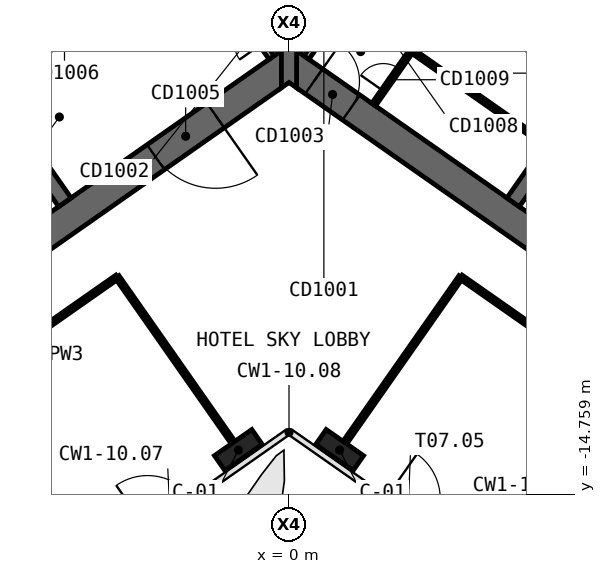
"""IFC4 building model, lengths in metres.
Left out: names, types, materials, properties, quantities, classifications, styles, units other than length and angle.
Written with IfcOpenShell. Run it as: python <this file> out.ifc"""

import sys

from ifc_helpers import new_model, si_unit, direction, frame, frame_2d, origin, origin_2d, place, context, subcontext, project, spatial, polyline, rectangle, outline, extrude, element, fill, save


model = new_model("IFC4")
c1 = context("Model", 3, precision=1e-05, world=origin(), true_north=direction((0.0, 1.0)))
c2 = subcontext(c1, "Body", "Model", "MODEL_VIEW")
j1 = project(units=[si_unit("LENGTHUNIT", "METRE"), si_unit("PLANEANGLEUNIT", "RADIAN")], contexts=[c1])
p1 = place(None, origin())
s1 = spatial("IfcSite", under=j1, at=p1, CompositionType="ELEMENT")
p2 = place(p1, origin())
s2 = spatial("IfcBuilding", under=s1, at=p2, CompositionType="ELEMENT")
p3 = place(p2, frame((0.0, 0.0, 48.5)))
s3 = spatial("IfcBuildingStorey", under=s2, at=p3, CompositionType="ELEMENT", Elevation=48.5)
p4 = place(p3, frame((0.037, 11.867, 0.0), z_axis=(0.0, 0.0, 1.0), x_axis=(-0.819155306259, -0.573571777746, 0.0)))
e1 = element("IfcWall", 1, at=p4, inside=s3, PredefinedType="SHEAR", context=c2, shape_type="SweptSolid", body=[
    extrude(outline(polyline([(33.837, 0.5), (0.7, 0.5), (0.0, -0.5), (33.837, -0.5), (33.837, 0.5)])), origin(), (0.0, 0.0, 1.0), 6.0),
])
p5 = place(p3, frame((0.037, -0.585, 0.0), z_axis=(0.0, 0.0, 1.0), x_axis=(-0.819157152511, -0.573569140985, 0.0)))
e2 = element("IfcWall", 2, at=p5, inside=s3, PredefinedType="SHEAR", context=c2, shape_type="SweptSolid", body=[
    extrude(outline(polyline([(26.695, 0.5), (0.7, 0.5), (0.0, -0.5), (26.695, -0.5), (26.695, 0.5)])), origin(), (0.0, 0.0, 1.0), 6.0),
])
p6 = place(p5, frame((2.995, 0.0, 0.0)))
e3 = element("IfcOpeningElement", 3, at=p6, cuts=e2, PredefinedType="OPENING", context=c2, shape_type="SweptSolid", body=[
    extrude(rectangle(XDim=2.4, YDim=2.1, at=frame_2d((1.2, 1.05))), frame((0.0, 0.51, 0.0), z_axis=(0.0, -1.0, 0.0), x_axis=(1.0, 0.0, 0.0)), (0.0, 0.0, 1.0), 1.02),
])
p7 = place(p5, frame((11.995, 0.0, 0.0)))
e4 = element("IfcOpeningElement", 4, at=p7, cuts=e2, PredefinedType="OPENING", context=c2, shape_type="SweptSolid", body=[
    extrude(rectangle(XDim=2.4, YDim=2.1, at=frame_2d((1.2, 1.05))), frame((0.0, 0.51, 0.0), z_axis=(0.0, -1.0, 0.0), x_axis=(1.0, 0.0, 0.0)), (0.0, 0.0, 1.0), 1.02),
])
p8 = place(p3, frame((-7.372, -5.162, 0.0), z_axis=(0.0, 0.0, 1.0), x_axis=(-0.573594173421, 0.819139624372, 0.0)))
e5 = element("IfcWall", 5, at=p8, inside=s3, PredefinedType="SHEAR", context=c2, shape_type="SweptSolid", body=[
    extrude(outline(polyline([(4.35, 0.25), (0.0, 0.25), (0.0, -0.25), (4.35, -0.25), (4.35, 0.25)])), origin(), (0.0, 0.0, 1.0), 6.0),
])
p9 = place(p3, frame((-2.638, 3.768, 0.0), z_axis=(0.0, 0.0, 1.0), x_axis=(-0.819148977158, -0.573580816643, 0.0)))
e6 = element("IfcWall", 6, at=p9, inside=s3, PredefinedType="SHEAR", context=c2, shape_type="SweptSolid", body=[
    extrude(outline(polyline([(26.0, 0.25), (0.0, 0.25), (0.0, -0.25), (26.0, -0.25), (26.0, 0.25)])), origin(), (0.0, 0.0, 1.0), 6.0),
])
p10 = place(p9, frame((1.169, 0.0, 0.0)))
e7 = element("IfcOpeningElement", 7, at=p10, cuts=e6, PredefinedType="OPENING", context=c2, shape_type="SweptSolid", body=[
    extrude(rectangle(XDim=1.1, YDim=2.1, at=frame_2d((0.55, 1.05))), frame((0.0, 0.26, 0.0), z_axis=(0.0, -1.0, 0.0), x_axis=(1.0, 0.0, 0.0)), (0.0, 0.0, 1.0), 0.52),
])
p11 = place(p9, frame((3.206, 0.0, 0.0)))
e8 = element("IfcOpeningElement", 8, at=p11, cuts=e6, PredefinedType="OPENING", context=c2, shape_type="SweptSolid", body=[
    extrude(rectangle(XDim=1.1, YDim=2.1, at=frame_2d((0.55, 1.05))), frame((0.0, 0.26, 0.0), z_axis=(0.0, -1.0, 0.0), x_axis=(1.0, 0.0, 0.0)), (0.0, 0.0, 1.0), 0.52),
])
p12 = place(p9, frame((5.244, 0.0, 0.0)))
e9 = element("IfcOpeningElement", 9, at=p12, cuts=e6, PredefinedType="OPENING", context=c2, shape_type="SweptSolid", body=[
    extrude(rectangle(XDim=1.1, YDim=2.1, at=frame_2d((0.55, 1.05))), frame((0.0, 0.26, 0.0), z_axis=(0.0, -1.0, 0.0), x_axis=(1.0, 0.0, 0.0)), (0.0, 0.0, 1.0), 0.52),
])
p13 = place(p9, frame((7.281, 0.0, 0.0)))
e10 = element("IfcOpeningElement", 10, at=p13, cuts=e6, PredefinedType="OPENING", context=c2, shape_type="SweptSolid", body=[
    extrude(rectangle(XDim=1.1, YDim=2.1, at=frame_2d((0.55, 1.05))), frame((0.0, 0.26, 0.0), z_axis=(0.0, -1.0, 0.0), x_axis=(1.0, 0.0, 0.0)), (0.0, 0.0, 1.0), 0.52),
])
p14 = place(p9, frame((9.688, 0.0, 0.0)))
e11 = element("IfcOpeningElement", 11, at=p14, cuts=e6, PredefinedType="OPENING", context=c2, shape_type="SweptSolid", body=[
    extrude(rectangle(XDim=1.1, YDim=2.1, at=frame_2d((0.55, 1.05))), frame((0.0, 0.26, 0.0), z_axis=(0.0, -1.0, 0.0), x_axis=(1.0, 0.0, 0.0)), (0.0, 0.0, 1.0), 0.52),
])
p15 = place(p9, frame((11.863, 0.0, 0.0)))
e12 = element("IfcOpeningElement", 12, at=p15, cuts=e6, PredefinedType="OPENING", context=c2, shape_type="SweptSolid", body=[
    extrude(rectangle(XDim=1.1, YDim=2.1, at=frame_2d((0.55, 1.05))), frame((0.0, 0.26, 0.0), z_axis=(0.0, -1.0, 0.0), x_axis=(1.0, 0.0, 0.0)), (0.0, 0.0, 1.0), 0.52),
])
p16 = place(p9, frame((14.038, 0.0, 0.0)))
e13 = element("IfcOpeningElement", 13, at=p16, cuts=e6, PredefinedType="OPENING", context=c2, shape_type="SweptSolid", body=[
    extrude(rectangle(XDim=1.1, YDim=2.1, at=frame_2d((0.55, 1.05))), frame((0.0, 0.26, 0.0), z_axis=(0.0, -1.0, 0.0), x_axis=(1.0, 0.0, 0.0)), (0.0, 0.0, 1.0), 0.52),
])
p17 = place(p9, frame((16.212, 0.0, 0.0)))
e14 = element("IfcOpeningElement", 14, at=p17, cuts=e6, PredefinedType="OPENING", context=c2, shape_type="SweptSolid", body=[
    extrude(rectangle(XDim=1.1, YDim=2.1, at=frame_2d((0.55, 1.05))), frame((0.0, 0.26, 0.0), z_axis=(0.0, -1.0, 0.0), x_axis=(1.0, 0.0, 0.0)), (0.0, 0.0, 1.0), 0.52),
])
p18 = place(p3, frame((-0.037, 11.867, 0.0), z_axis=(0.0, 0.0, 1.0), x_axis=(0.819155306259, -0.573571777746, 0.0)))
e15 = element("IfcWall", 15, at=p18, inside=s3, PredefinedType="SHEAR", context=c2, shape_type="SweptSolid", body=[
    extrude(outline(polyline([(33.837, 0.5), (0.0, 0.5), (0.7, -0.5), (33.837, -0.5), (33.837, 0.5)])), origin(), (0.0, 0.0, 1.0), 6.0),
])
p19 = place(p3, frame((-0.037, -0.585, 0.0), z_axis=(0.0, 0.0, 1.0), x_axis=(0.819157152511, -0.573569140985, 0.0)))
e16 = element("IfcWall", 16, at=p19, inside=s3, PredefinedType="SHEAR", context=c2, shape_type="SweptSolid", body=[
    extrude(outline(polyline([(26.695, 0.5), (0.0, 0.5), (0.7, -0.5), (26.695, -0.5), (26.695, 0.5)])), origin(), (0.0, 0.0, 1.0), 6.0),
])
p20 = place(p19, frame((1.045, 0.0, 0.0)))
e17 = element("IfcOpeningElement", 17, at=p20, cuts=e16, PredefinedType="OPENING", context=c2, shape_type="SweptSolid", body=[
    extrude(rectangle(XDim=1.5, YDim=2.1, at=frame_2d((0.75, 1.05))), frame((0.0, 0.51, 0.0), z_axis=(0.0, -1.0, 0.0), x_axis=(1.0, 0.0, 0.0)), (0.0, 0.0, 1.0), 1.02),
])
p21 = place(p19, frame((12.445, 0.0, 0.0)))
e18 = element("IfcOpeningElement", 18, at=p21, cuts=e16, PredefinedType="OPENING", context=c2, shape_type="SweptSolid", body=[
    extrude(rectangle(XDim=1.5, YDim=2.1, at=frame_2d((0.75, 1.05))), frame((0.0, 0.51, 0.0), z_axis=(0.0, -1.0, 0.0), x_axis=(1.0, 0.0, 0.0)), (0.0, 0.0, 1.0), 1.02),
])
p22 = place(p3, frame((7.372, -5.162, 0.0), z_axis=(0.0, 0.0, 1.0), x_axis=(0.573594173421, 0.819139624372, 0.0)))
e19 = element("IfcWall", 19, at=p22, inside=s3, PredefinedType="SHEAR", context=c2, shape_type="SweptSolid", body=[
    extrude(outline(polyline([(0.0, 0.25), (0.0, -0.25), (4.35, -0.25), (4.35, 0.25), (0.0, 0.25)])), origin(), (0.0, 0.0, 1.0), 6.0),
])
p23 = place(p3, frame((2.638, 3.768, 0.0), z_axis=(0.0, 0.0, 1.0), x_axis=(0.819148977158, -0.573580816643, 0.0)))
e20 = element("IfcWall", 20, at=p23, inside=s3, PredefinedType="SHEAR", context=c2, shape_type="SweptSolid", body=[
    extrude(outline(polyline([(0.0, 0.25), (0.0, -0.25), (26.0, -0.25), (26.0, 0.25), (0.0, 0.25)])), origin(), (0.0, 0.0, 1.0), 6.0),
])
p24 = place(p23, frame((9.637, 0.0, 0.0)))
e21 = element("IfcOpeningElement", 21, at=p24, cuts=e20, PredefinedType="OPENING", context=c2, shape_type="SweptSolid", body=[
    extrude(rectangle(XDim=1.2, YDim=2.1, at=frame_2d((0.6, 1.05))), frame((0.0, 0.26, 0.0), z_axis=(0.0, -1.0, 0.0), x_axis=(1.0, 0.0, 0.0)), (0.0, 0.0, 1.0), 0.52),
])
p25 = place(p23, frame((11.812, 0.0, 0.0)))
e22 = element("IfcOpeningElement", 22, at=p25, cuts=e20, PredefinedType="OPENING", context=c2, shape_type="SweptSolid", body=[
    extrude(rectangle(XDim=1.2, YDim=2.1, at=frame_2d((0.6, 1.05))), frame((0.0, 0.26, 0.0), z_axis=(0.0, -1.0, 0.0), x_axis=(1.0, 0.0, 0.0)), (0.0, 0.0, 1.0), 0.52),
])
p26 = place(p23, frame((13.988, 0.0, 0.0)))
e23 = element("IfcOpeningElement", 23, at=p26, cuts=e20, PredefinedType="OPENING", context=c2, shape_type="SweptSolid", body=[
    extrude(rectangle(XDim=1.2, YDim=2.1, at=frame_2d((0.6, 1.05))), frame((0.0, 0.26, 0.0), z_axis=(0.0, -1.0, 0.0), x_axis=(1.0, 0.0, 0.0)), (0.0, 0.0, 1.0), 0.52),
])
p27 = place(p23, frame((16.262, 0.0, 0.0)))
e24 = element("IfcOpeningElement", 24, at=p27, cuts=e20, PredefinedType="OPENING", context=c2, shape_type="SweptSolid", body=[
    extrude(rectangle(XDim=1.0, YDim=2.1, at=frame_2d((0.5, 1.05))), frame((0.0, 0.26, 0.0), z_axis=(0.0, -1.0, 0.0), x_axis=(1.0, 0.0, 0.0)), (0.0, 0.0, 1.0), 0.52),
])
p28 = place(p3, frame((0.0, -1.396, 0.0), z_axis=(0.0, 0.0, 1.0), x_axis=(0.0, 1.0, 0.0)))
e25 = element("IfcWall", 25, at=p28, inside=s3, PredefinedType="SHEAR", context=c2, shape_type="SweptSolid", body=[
    extrude(outline(polyline([(0.0, -0.25), (0.175, -0.25), (1.221, -0.25), (12.452, -0.25), (13.848, -0.25), (13.857, -0.25), (13.968, -0.172), (13.848, 0.0), (13.968, 0.172), (13.857, 0.25), (13.848, 0.25), (12.452, 0.25), (1.221, 0.25), (0.175, 0.25), (0.0, 0.25), (0.175, 0.0), (0.0, -0.25)])), origin(), (0.0, 0.0, 1.0), 6.0),
])
for number, where, z_axis, x_axis in (
    (26, (-1.665, -13.313, 0.0), (0.0, 0.0, 1.0), (-0.819, -0.574, 0.0)),
    (27, (1.665, -13.313, 0.0), (0.0, 0.0, 1.0), (0.819, -0.574, 0.0)),
):
    element("IfcColumn", number, at=place(p3, frame(where, z_axis=z_axis, x_axis=x_axis)), inside=s3, PredefinedType="COLUMN", context=c2, shape_type="SweptSolid", body=[
        extrude(rectangle(XDim=1.5, YDim=0.6, at=origin_2d()), origin(), (0.0, 0.0, 1.0), 6.0),
    ])
p29 = place(p3, frame((2.785, -1.95, 0.0), z_axis=(0.0, 0.0, 1.0), x_axis=(0.57356780395, 0.819158088694, 0.0)))
e28 = element("IfcWall", 28, at=p29, inside=s3, PredefinedType="PARTITIONING", context=c2, shape_type="SweptSolid", body=[
    extrude(rectangle(XDim=4.35, YDim=0.15, at=frame_2d((2.175, 0.0))), origin(), (0.0, 0.0, 1.0), 5.72),
])
p30 = place(p29, frame((0.55, 0.0, 0.0)))
e29 = element("IfcOpeningElement", 29, at=p30, cuts=e28, PredefinedType="OPENING", context=c2, shape_type="SweptSolid", body=[
    extrude(rectangle(XDim=0.9, YDim=2.1, at=frame_2d((0.45, 1.05))), frame((0.0, 0.085, 0.0), z_axis=(0.0, -1.0, 0.0), x_axis=(1.0, 0.0, 0.0)), (0.0, 0.0, 1.0), 0.17),
])
p31 = place(p29, frame((2.825, 0.0, 0.0)))
e30 = element("IfcOpeningElement", 30, at=p31, cuts=e28, PredefinedType="OPENING", context=c2, shape_type="SweptSolid", body=[
    extrude(rectangle(XDim=0.9, YDim=2.1, at=frame_2d((0.45, 1.05))), frame((0.0, 0.085, 0.0), z_axis=(0.0, -1.0, 0.0), x_axis=(1.0, 0.0, 0.0)), (0.0, 0.0, 1.0), 0.17),
])
p32 = place(p3, frame((4.033, -0.168, 0.0), z_axis=(0.0, 0.0, 1.0), x_axis=(0.819146154531, -0.573584847705, 0.0)))
e31 = element("IfcWall", 31, at=p32, inside=s3, PredefinedType="PARTITIONING", context=c2, shape_type="SweptSolid", body=[
    extrude(rectangle(XDim=5.35, YDim=0.15, at=frame_2d((2.675, 0.0))), origin(), (0.0, 0.0, 1.0), 5.72),
])
p33 = place(p3, frame((-0.573, -0.402, 0.0), z_axis=(0.0, 0.0, 1.0), x_axis=(-0.57356780395, 0.819158088694, 0.0)))
e32 = element("IfcWall", 32, at=p33, inside=s3, PredefinedType="SOLIDWALL", context=c2, shape_type="SweptSolid", body=[
    extrude(rectangle(XDim=4.35, YDim=0.2, at=frame_2d((2.175, 0.0))), origin(), (0.0, 0.0, 1.0), 5.72),
])
p34 = place(p33, frame((0.55, 0.0, 0.0)))
e33 = element("IfcOpeningElement", 33, at=p34, cuts=e32, PredefinedType="OPENING", context=c2, shape_type="SweptSolid", body=[
    extrude(rectangle(XDim=0.9, YDim=2.1, at=frame_2d((0.45, 1.05))), frame((0.0, 0.11, 0.0), z_axis=(0.0, -1.0, 0.0), x_axis=(1.0, 0.0, 0.0)), (0.0, 0.0, 1.0), 0.22),
])
p35 = place(p3, frame((0.573, -0.402, 0.0), z_axis=(0.0, 0.0, 1.0), x_axis=(0.57356780395, 0.819158088694, 0.0)))
e34 = element("IfcWall", 34, at=p35, inside=s3, PredefinedType="SOLIDWALL", context=c2, shape_type="SweptSolid", body=[
    extrude(rectangle(XDim=4.35, YDim=0.2, at=frame_2d((2.175, 0.0))), origin(), (0.0, 0.0, 1.0), 5.72),
])
p36 = place(p35, frame((0.55, 0.0, 0.0)))
e35 = element("IfcOpeningElement", 35, at=p36, cuts=e34, PredefinedType="OPENING", context=c2, shape_type="SweptSolid", body=[
    extrude(rectangle(XDim=0.9, YDim=2.1, at=frame_2d((0.45, 1.05))), frame((0.0, 0.11, 0.0), z_axis=(0.0, -1.0, 0.0), x_axis=(1.0, 0.0, 0.0)), (0.0, 0.0, 1.0), 0.22),
])
p37 = place(p3, frame((-5.173, -16.318, 0.0), z_axis=(0.0, 0.0, 1.0), x_axis=(0.819138730461, 0.573595449998, 0.0)))
e36 = element("IfcWall", 36, at=p37, inside=s3, PredefinedType="SOLIDWALL", context=c2, shape_type="SweptSolid", body=[
    extrude(rectangle(XDim=3.077, YDim=0.2, at=frame_2d((1.539, 0.0))), origin(), (0.0, 0.0, 1.0), 5.72),
])
p38 = place(p37, frame((0.639, 0.0, 0.0)))
e37 = element("IfcOpeningElement", 37, at=p38, cuts=e36, PredefinedType="OPENING", context=c2, shape_type="SweptSolid", body=[
    extrude(rectangle(XDim=1.8, YDim=2.4, at=frame_2d((0.9, 1.2))), frame((0.0, 0.11, 0.0), z_axis=(0.0, -1.0, 0.0), x_axis=(1.0, 0.0, 0.0)), (0.0, 0.0, 1.0), 0.22),
])
p39 = place(p3, frame((2.652, -14.553, 0.0), z_axis=(0.0, 0.0, 1.0), x_axis=(0.819138730461, -0.573595449998, 0.0)))
e38 = element("IfcWall", 38, at=p39, inside=s3, PredefinedType="SOLIDWALL", context=c2, shape_type="SweptSolid", body=[
    extrude(rectangle(XDim=3.077, YDim=0.2, at=frame_2d((1.539, 0.0))), origin(), (0.0, 0.0, 1.0), 5.72),
])
p40 = place(p39, frame((0.639, 0.0, 0.0)))
e39 = element("IfcOpeningElement", 39, at=p40, cuts=e38, PredefinedType="OPENING", context=c2, shape_type="SweptSolid", body=[
    extrude(rectangle(XDim=1.8, YDim=2.4, at=frame_2d((0.9, 1.2))), frame((0.0, 0.11, 0.0), z_axis=(0.0, -1.0, 0.0), x_axis=(1.0, 0.0, 0.0)), (0.0, 0.0, 1.0), 0.22),
])
p41 = place(p3, frame((13.026, -12.783, 0.0), z_axis=(0.0, 0.0, 1.0), x_axis=(-0.81915291695, 0.57357519006, 0.0)))
e40 = element("IfcWall", 40, at=p41, inside=s3, PredefinedType="PARTITIONING", context=c2, shape_type="SweptSolid", body=[
    extrude(rectangle(XDim=9.002, YDim=0.15, at=frame_2d((4.501, 0.0))), origin(), (0.0, 0.0, 1.0), 5.0),
])
p42 = place(p41, frame((4.051, 0.0, 0.0)))
e41 = element("IfcOpeningElement", 41, at=p42, cuts=e40, PredefinedType="OPENING", context=c2, shape_type="SweptSolid", body=[
    extrude(rectangle(XDim=0.9, YDim=2.1, at=frame_2d((0.45, 1.05))), frame((0.0, 0.085, 0.0), z_axis=(0.0, -1.0, 0.0), x_axis=(1.0, 0.0, 0.0)), (0.0, 0.0, 1.0), 0.17),
])
p43 = place(p3, frame((-5.652, -7.62, 0.0), z_axis=(0.0, 0.0, 1.0), x_axis=(-0.81915291695, -0.57357519006, 0.0)))
e42 = element("IfcWall", 42, at=p43, inside=s3, PredefinedType="PARTITIONING", context=c2, shape_type="SweptSolid", body=[
    extrude(rectangle(XDim=9.002, YDim=0.15, at=frame_2d((4.501, 0.0))), origin(), (0.0, 0.0, 1.0), 5.0),
])
p44 = place(p43, frame((3.901, 0.0, 0.0)))
e43 = element("IfcOpeningElement", 43, at=p44, cuts=e42, PredefinedType="OPENING", context=c2, shape_type="SweptSolid", body=[
    extrude(rectangle(XDim=1.2, YDim=2.4, at=frame_2d((0.6, 1.2))), frame((0.0, 0.085, 0.0), z_axis=(0.0, -1.0, 0.0), x_axis=(1.0, 0.0, 0.0)), (0.0, 0.0, 1.0), 0.17),
])
p45 = place(p3, frame((1.849, -13.051, 0.0), z_axis=(0.0, 0.0, 1.0), x_axis=(0.57357355307, 0.819154063177, 0.0)))
e44 = element("IfcWall", 44, at=p45, inside=s3, PredefinedType="PARTITIONING", context=c2, shape_type="SweptSolid", body=[
    extrude(rectangle(XDim=6.63, YDim=0.15, at=frame_2d((3.315, 0.0))), origin(), (0.0, 0.0, 1.0), 5.0),
])
p46 = place(p3, frame((-1.849, -13.051, 0.0), z_axis=(0.0, 0.0, 1.0), x_axis=(-0.573575988258, 0.819152358047, 0.0)))
e45 = element("IfcWall", 45, at=p46, inside=s3, PredefinedType="PARTITIONING", context=c2, shape_type="SweptSolid", body=[
    extrude(rectangle(XDim=6.632, YDim=0.15, at=frame_2d((3.316, 0.0))), origin(), (0.0, 0.0, 1.0), 5.0),
])
p47 = place(p6, origin())
e46 = element("IfcDoor", 46, at=p47, inside=s3, OperationType="DOUBLE_DOOR_SINGLE_SWING", PredefinedType="DOOR", context=c2, shape_type="SweptSolid", body=[
    extrude(rectangle(XDim=2.4, YDim=2.1, at=frame_2d((1.2, 1.05))), frame((0.0, 0.025, 0.0), z_axis=(0.0, -1.0, 0.0), x_axis=(1.0, 0.0, 0.0)), (0.0, 0.0, 1.0), 0.05),
])
fill(e3, e46)
p48 = place(p30, origin())
e47 = element("IfcDoor", 47, at=p48, inside=s3, OperationType="SINGLE_SWING_RIGHT", PredefinedType="DOOR", context=c2, shape_type="SweptSolid", body=[
    extrude(rectangle(XDim=0.9, YDim=2.1, at=frame_2d((0.45, 1.05))), frame((0.0, 0.025, 0.0), z_axis=(0.0, -1.0, 0.0), x_axis=(1.0, 0.0, 0.0)), (0.0, 0.0, 1.0), 0.05),
])
fill(e29, e47)
p49 = place(p20, origin())
e48 = element("IfcDoor", 48, at=p49, inside=s3, OperationType="SINGLE_SWING_RIGHT", PredefinedType="DOOR", context=c2, shape_type="SweptSolid", body=[
    extrude(rectangle(XDim=1.5, YDim=2.1, at=frame_2d((0.75, 1.05))), frame((0.0, 0.025, 0.0), z_axis=(0.0, -1.0, 0.0), x_axis=(1.0, 0.0, 0.0)), (0.0, 0.0, 1.0), 0.05),
])
fill(e17, e48)
save(model, sys.argv[1])
